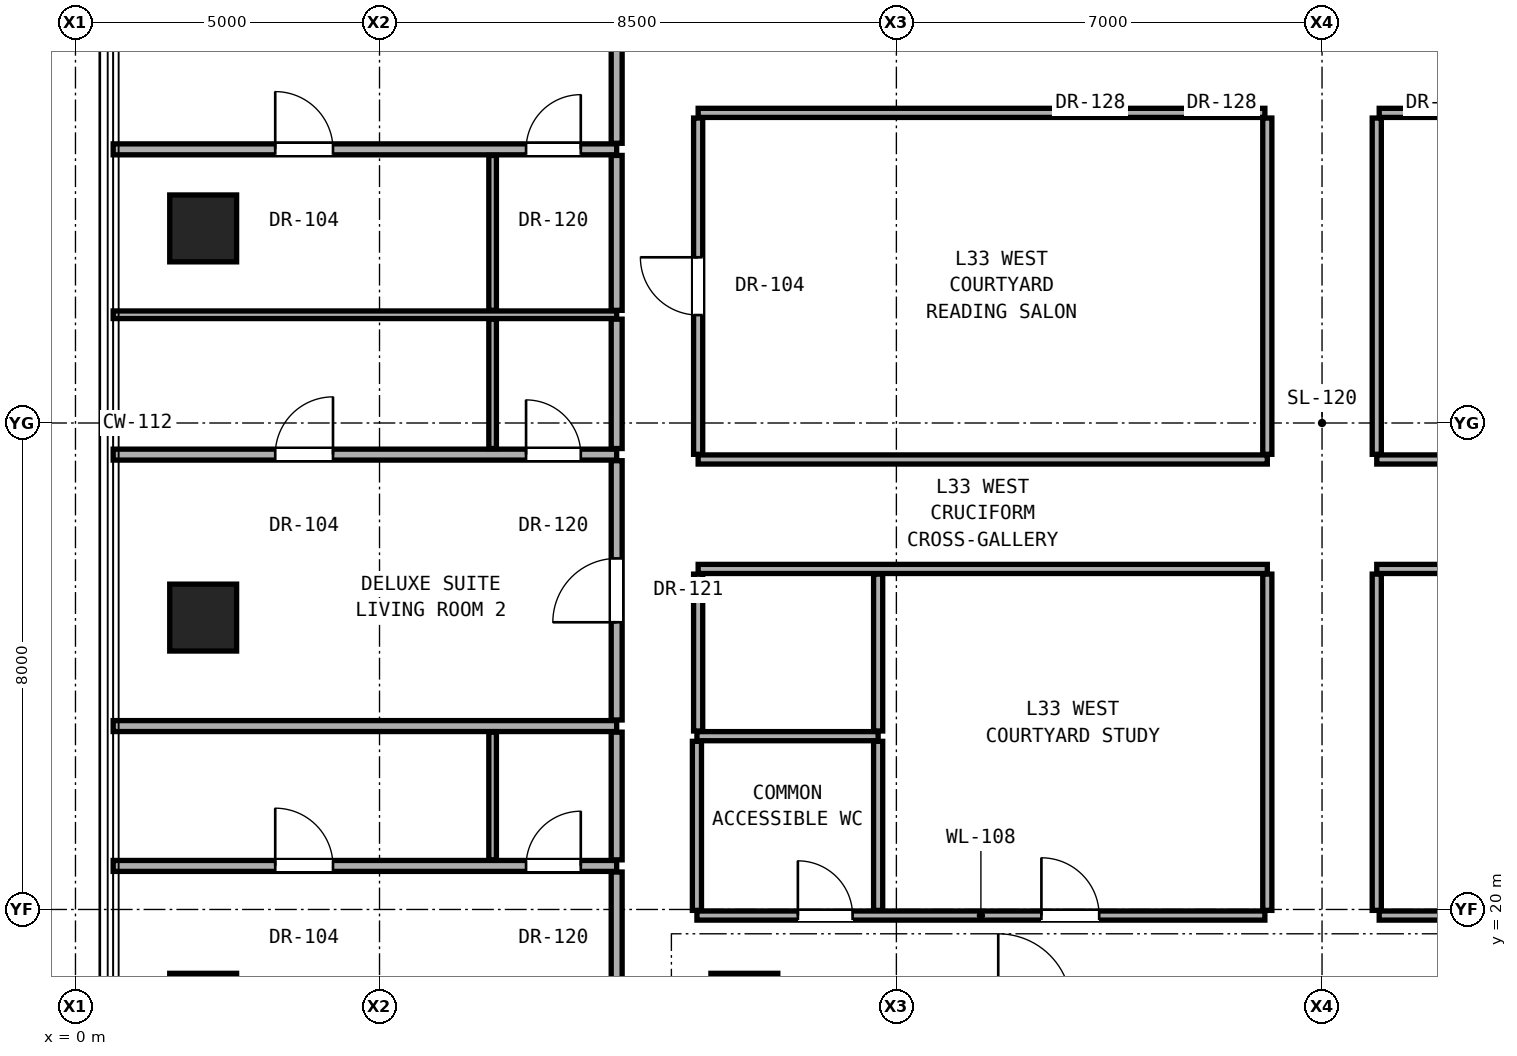
"""IFC4 building model, lengths in metres.
Left out: names, types, materials, properties, quantities, classifications, styles, units other than length and angle.
Written with IfcOpenShell. Run it as: python <this file> out.ifc"""

import sys

from ifc_helpers import new_model, si_unit, direction, frame, frame_2d, origin, origin_2d, place, context, subcontext, project, spatial, rectangle, hollow_rectangle, extrude, element, fill, save


model = new_model("IFC4")
c1 = context("Model", 3, precision=1e-05, world=origin(), true_north=direction((0.0, 1.0)))
c2 = subcontext(c1, "Body", "Model", "MODEL_VIEW")
j1 = project(units=[si_unit("LENGTHUNIT", "METRE"), si_unit("PLANEANGLEUNIT", "RADIAN")], contexts=[c1])
p1 = place(None, origin())
s1 = spatial("IfcSite", under=j1, at=p1, CompositionType="ELEMENT")
p2 = place(p1, origin())
s2 = spatial("IfcBuilding", under=s1, at=p2, CompositionType="ELEMENT")
p3 = place(p2, frame((0.0, 0.0, 118.1)))
s3 = spatial("IfcBuildingStorey", under=s2, at=p3, CompositionType="ELEMENT", Elevation=118.1)
p4 = place(p3, frame((11.0, 18.4, 0.0), z_axis=(0.0, 0.0, 1.0), x_axis=(1.0, 0.0, 0.0)))
e1 = element("IfcColumn", 1, at=p4, inside=s3, PredefinedType="COLUMN", context=c2, shape_type="SweptSolid", body=[
    extrude(rectangle(XDim=1.1, YDim=1.1, at=origin_2d()), origin(), (0.0, 0.0, 1.0), 3.3),
])
for number, where, z_axis, x_axis in (
    (2, (2.1, 18.4, 0.0), (0.0, 0.0, 1.0), (1.0, 0.0, 0.0)),
    (3, (2.1, 24.8, 0.0), (0.0, 0.0, 1.0), (1.0, 0.0, 0.0)),
    (4, (2.1, 31.2, 0.0), (0.0, 0.0, 1.0), (1.0, 0.0, 0.0)),
):
    element("IfcColumn", number, at=place(p3, frame(where, z_axis=z_axis, x_axis=x_axis)), inside=s3, PredefinedType="COLUMN", context=c2, shape_type="SweptSolid", body=[
        extrude(hollow_rectangle(XDim=1.1, YDim=1.1, WallThickness=0.06, at=origin_2d()), origin(), (0.0, 0.0, 1.0), 3.3),
    ])
p5 = place(p3, frame((10.22, 19.9, 0.0), z_axis=(0.0, 0.0, 1.0), x_axis=(1.0, 0.0, 0.0)))
e5 = element("IfcWall", 5, at=p5, inside=s3, PredefinedType="PARTITIONING", context=c2, shape_type="SweptSolid", body=[
    extrude(rectangle(XDim=9.34, YDim=0.15, at=frame_2d((4.67, 0.0))), origin(), (0.0, 0.0, 1.0), 2.216),
])
p6 = place(p5, frame((1.66, 0.0, 0.0)))
e6 = element("IfcOpeningElement", 6, at=p6, cuts=e5, PredefinedType="OPENING", context=c2, shape_type="SweptSolid", body=[
    extrude(rectangle(XDim=0.9, YDim=2.1, at=frame_2d((0.45, 1.05))), frame((0.0, 0.085, 0.0), z_axis=(0.0, -1.0, 0.0), x_axis=(1.0, 0.0, 0.0)), (0.0, 0.0, 1.0), 0.17),
])
p7 = place(p5, frame((5.665, 0.0, 0.0)))
e7 = element("IfcOpeningElement", 7, at=p7, cuts=e5, PredefinedType="OPENING", context=c2, shape_type="SweptSolid", body=[
    extrude(rectangle(XDim=0.95, YDim=2.15, at=frame_2d((0.475, 1.075))), frame((0.0, 0.085, 0.0), z_axis=(0.0, -1.0, 0.0), x_axis=(1.0, 0.0, 0.0)), (0.0, 0.0, 1.0), 0.17),
])
p8 = place(p3, frame((21.44, 19.9, 0.0), z_axis=(0.0, 0.0, 1.0), x_axis=(1.0, 0.0, 0.0)))
e8 = element("IfcWall", 8, at=p8, inside=s3, PredefinedType="PARTITIONING", context=c2, shape_type="SweptSolid", body=[
    extrude(rectangle(XDim=9.32, YDim=0.15, at=frame_2d((4.66, 0.0))), origin(), (0.0, 0.0, 1.0), 2.216),
])
p9 = place(p8, frame((4.185, 0.0, 0.0)))
e9 = element("IfcOpeningElement", 9, at=p9, cuts=e8, PredefinedType="OPENING", context=c2, shape_type="SweptSolid", body=[
    extrude(rectangle(XDim=0.95, YDim=2.15, at=frame_2d((0.475, 1.075))), frame((0.0, 0.085, 0.0), z_axis=(0.0, -1.0, 0.0), x_axis=(1.0, 0.0, 0.0)), (0.0, 0.0, 1.0), 0.17),
])
p10 = place(p3, frame((0.62, 20.716, 0.0), z_axis=(0.0, 0.0, 1.0), x_axis=(1.0, 0.0, 0.0)))
e10 = element("IfcWall", 10, at=p10, inside=s3, PredefinedType="PARTITIONING", context=c2, shape_type="SweptSolid", body=[
    extrude(rectangle(XDim=8.28, YDim=0.18, at=frame_2d((4.14, 0.0))), origin(), (0.0, 0.0, 1.0), 2.299),
])
p11 = place(p10, frame((2.665, 0.0, 0.0)))
e11 = element("IfcOpeningElement", 11, at=p11, cuts=e10, PredefinedType="OPENING", context=c2, shape_type="SweptSolid", body=[
    extrude(rectangle(XDim=0.95, YDim=2.15, at=frame_2d((0.475, 1.075))), frame((0.0, 0.1, 0.0), z_axis=(0.0, -1.0, 0.0), x_axis=(1.0, 0.0, 0.0)), (0.0, 0.0, 1.0), 0.2),
])
p12 = place(p10, frame((6.79, 0.0, 0.0)))
e12 = element("IfcOpeningElement", 12, at=p12, cuts=e10, PredefinedType="OPENING", context=c2, shape_type="SweptSolid", body=[
    extrude(rectangle(XDim=0.9, YDim=2.1, at=frame_2d((0.45, 1.05))), frame((0.0, 0.1, 0.0), z_axis=(0.0, -1.0, 0.0), x_axis=(1.0, 0.0, 0.0)), (0.0, 0.0, 1.0), 0.2),
])
p13 = place(p3, frame((10.22, 22.85, 0.0), z_axis=(0.0, 0.0, 1.0), x_axis=(1.0, 0.0, 0.0)))
e13 = element("IfcWall", 13, at=p13, inside=s3, PredefinedType="PARTITIONING", context=c2, shape_type="SweptSolid", body=[
    extrude(rectangle(XDim=2.98, YDim=0.15, at=frame_2d((1.49, 0.0))), origin(), (0.0, 0.0, 1.0), 2.216),
])
p14 = place(p3, frame((0.62, 23.016, 0.0), z_axis=(0.0, 0.0, 1.0), x_axis=(1.0, 0.0, 0.0)))
e14 = element("IfcWall", 14, at=p14, inside=s3, PredefinedType="PARTITIONING", context=c2, shape_type="SweptSolid", body=[
    extrude(rectangle(XDim=8.28, YDim=0.18, at=frame_2d((4.14, 0.0))), origin(), (0.0, 0.0, 1.0), 2.299),
])
for number, where, z_axis, x_axis in (
    (15, (10.24, 25.6, 0.0), (0.0, 0.0, 1.0), (1.0, 0.0, 0.0)),
    (16, (21.4, 25.6, 0.0), (0.0, 0.0, 1.0), (1.0, 0.0, 0.0)),
):
    element("IfcWall", number, at=place(p3, frame(where, z_axis=z_axis, x_axis=x_axis)), inside=s3, PredefinedType="PARTITIONING", context=c2, shape_type="SweptSolid", body=[
        extrude(rectangle(XDim=9.36, YDim=0.15, at=frame_2d((4.68, 0.0))), origin(), (0.0, 0.0, 1.0), 2.216),
    ])
p15 = place(p3, frame((0.62, 27.48, 0.0), z_axis=(0.0, 0.0, 1.0), x_axis=(1.0, 0.0, 0.0)))
e17 = element("IfcWall", 17, at=p15, inside=s3, PredefinedType="PARTITIONING", context=c2, shape_type="SweptSolid", body=[
    extrude(rectangle(XDim=8.28, YDim=0.18, at=frame_2d((4.14, 0.0))), origin(), (0.0, 0.0, 1.0), 2.299),
])
p16 = place(p15, frame((2.665, 0.0, 0.0)))
e18 = element("IfcOpeningElement", 18, at=p16, cuts=e17, PredefinedType="OPENING", context=c2, shape_type="SweptSolid", body=[
    extrude(rectangle(XDim=0.95, YDim=2.15, at=frame_2d((0.475, 1.075))), frame((0.0, 0.1, 0.0), z_axis=(0.0, -1.0, 0.0), x_axis=(1.0, 0.0, 0.0)), (0.0, 0.0, 1.0), 0.2),
])
p17 = place(p15, frame((6.79, 0.0, 0.0)))
e19 = element("IfcOpeningElement", 19, at=p17, cuts=e17, PredefinedType="OPENING", context=c2, shape_type="SweptSolid", body=[
    extrude(rectangle(XDim=0.9, YDim=2.1, at=frame_2d((0.45, 1.05))), frame((0.0, 0.1, 0.0), z_axis=(0.0, -1.0, 0.0), x_axis=(1.0, 0.0, 0.0)), (0.0, 0.0, 1.0), 0.2),
])
for number, where, z_axis, x_axis in (
    (20, (10.24, 27.4, 0.0), (0.0, 0.0, 1.0), (1.0, 0.0, 0.0)),
    (21, (21.4, 27.4, 0.0), (0.0, 0.0, 1.0), (1.0, 0.0, 0.0)),
):
    element("IfcWall", number, at=place(p3, frame(where, z_axis=z_axis, x_axis=x_axis)), inside=s3, PredefinedType="PARTITIONING", context=c2, shape_type="SweptSolid", body=[
        extrude(rectangle(XDim=9.36, YDim=0.15, at=frame_2d((4.68, 0.0))), origin(), (0.0, 0.0, 1.0), 2.216),
    ])
p18 = place(p3, frame((0.62, 29.78, 0.0), z_axis=(0.0, 0.0, 1.0), x_axis=(1.0, 0.0, 0.0)))
e22 = element("IfcWall", 22, at=p18, inside=s3, PredefinedType="PARTITIONING", context=c2, shape_type="SweptSolid", body=[
    extrude(rectangle(XDim=8.28, YDim=0.125, at=frame_2d((4.14, 0.0))), origin(), (0.0, 0.0, 1.0), 2.299),
])
p19 = place(p3, frame((0.62, 32.5, 0.0), z_axis=(0.0, 0.0, 1.0), x_axis=(1.0, 0.0, 0.0)))
e23 = element("IfcWall", 23, at=p19, inside=s3, PredefinedType="PARTITIONING", context=c2, shape_type="SweptSolid", body=[
    extrude(rectangle(XDim=8.28, YDim=0.18, at=frame_2d((4.14, 0.0))), origin(), (0.0, 0.0, 1.0), 2.299),
])
p20 = place(p19, frame((2.665, 0.0, 0.0)))
e24 = element("IfcOpeningElement", 24, at=p20, cuts=e23, PredefinedType="OPENING", context=c2, shape_type="SweptSolid", body=[
    extrude(rectangle(XDim=0.95, YDim=2.15, at=frame_2d((0.475, 1.075))), frame((0.0, 0.1, 0.0), z_axis=(0.0, -1.0, 0.0), x_axis=(1.0, 0.0, 0.0)), (0.0, 0.0, 1.0), 0.2),
])
p21 = place(p19, frame((6.79, 0.0, 0.0)))
e25 = element("IfcOpeningElement", 25, at=p21, cuts=e23, PredefinedType="OPENING", context=c2, shape_type="SweptSolid", body=[
    extrude(rectangle(XDim=0.9, YDim=2.1, at=frame_2d((0.45, 1.05))), frame((0.0, 0.1, 0.0), z_axis=(0.0, -1.0, 0.0), x_axis=(1.0, 0.0, 0.0)), (0.0, 0.0, 1.0), 0.2),
])
p22 = place(p3, frame((10.24, 33.1, 0.0), z_axis=(0.0, 0.0, 1.0), x_axis=(1.0, 0.0, 0.0)))
e26 = element("IfcWall", 26, at=p22, inside=s3, PredefinedType="PARTITIONING", context=c2, shape_type="SweptSolid", body=[
    extrude(rectangle(XDim=9.32, YDim=0.15, at=frame_2d((4.66, 0.0))), origin(), (0.0, 0.0, 1.0), 2.216),
])
p23 = place(p3, frame((21.44, 33.1, 0.0), z_axis=(0.0, 0.0, 1.0), x_axis=(1.0, 0.0, 0.0)))
e27 = element("IfcWall", 27, at=p23, inside=s3, PredefinedType="PARTITIONING", context=c2, shape_type="SweptSolid", body=[
    extrude(rectangle(XDim=9.32, YDim=0.15, at=frame_2d((4.66, 0.0))), origin(), (0.0, 0.0, 1.0), 2.216),
])
p24 = place(p23, frame((4.185, 0.0, 0.0)))
e28 = element("IfcOpeningElement", 28, at=p24, cuts=e27, PredefinedType="OPENING", context=c2, shape_type="SweptSolid", body=[
    extrude(rectangle(XDim=0.95, YDim=2.15, at=frame_2d((0.475, 1.075))), frame((0.0, 0.085, 0.0), z_axis=(0.0, -1.0, 0.0), x_axis=(1.0, 0.0, 0.0)), (0.0, 0.0, 1.0), 0.17),
])
p25 = place(p3, frame((6.86, 20.816, 0.0), z_axis=(0.0, 0.0, 1.0), x_axis=(0.0, 1.0, 0.0)))
e29 = element("IfcWall", 29, at=p25, inside=s3, PredefinedType="PARTITIONING", context=c2, shape_type="SweptSolid", body=[
    extrude(rectangle(XDim=2.1, YDim=0.125, at=frame_2d((1.05, 0.0))), origin(), (0.0, 0.0, 1.0), 3.08),
])
p26 = place(p3, frame((6.86, 27.58, 0.0), z_axis=(0.0, 0.0, 1.0), x_axis=(0.0, 1.0, 0.0)))
e30 = element("IfcWall", 30, at=p26, inside=s3, PredefinedType="PARTITIONING", context=c2, shape_type="SweptSolid", body=[
    extrude(rectangle(XDim=2.127, YDim=0.125, at=frame_2d((1.064, 0.0))), origin(), (0.0, 0.0, 1.0), 3.08),
])
p27 = place(p3, frame((6.86, 29.853, 0.0), z_axis=(0.0, 0.0, 1.0), x_axis=(0.0, 1.0, 0.0)))
e31 = element("IfcWall", 31, at=p27, inside=s3, PredefinedType="PARTITIONING", context=c2, shape_type="SweptSolid", body=[
    extrude(rectangle(XDim=2.547, YDim=0.125, at=frame_2d((1.274, 0.0))), origin(), (0.0, 0.0, 1.0), 2.299),
])
p28 = place(p3, frame((8.9, 15.05, 0.0), z_axis=(0.0, 0.0, 1.0), x_axis=(0.0, 1.0, 0.0)))
e32 = element("IfcWall", 32, at=p28, inside=s3, PredefinedType="PARTITIONING", context=c2, shape_type="SweptSolid", body=[
    extrude(rectangle(XDim=5.566, YDim=0.18, at=frame_2d((2.783, 0.0))), origin(), (0.0, 0.0, 1.0), 2.456),
])
p29 = place(p28, frame((2.258, 0.0, 0.0)))
e33 = element("IfcOpeningElement", 33, at=p29, cuts=e32, PredefinedType="OPENING", context=c2, shape_type="SweptSolid", body=[
    extrude(rectangle(XDim=1.05, YDim=2.2, at=frame_2d((0.525, 1.1))), frame((0.0, 0.1, 0.0), z_axis=(0.0, -1.0, 0.0), x_axis=(1.0, 0.0, 0.0)), (0.0, 0.0, 1.0), 0.2),
])
p30 = place(p3, frame((8.9, 20.816, 0.0), z_axis=(0.0, 0.0, 1.0), x_axis=(0.0, 1.0, 0.0)))
e34 = element("IfcWall", 34, at=p30, inside=s3, PredefinedType="PARTITIONING", context=c2, shape_type="SweptSolid", body=[
    extrude(rectangle(XDim=2.1, YDim=0.18, at=frame_2d((1.05, 0.0))), origin(), (0.0, 0.0, 1.0), 3.08),
])
p31 = place(p3, frame((8.9, 23.116, 0.0), z_axis=(0.0, 0.0, 1.0), x_axis=(0.0, 1.0, 0.0)))
e35 = element("IfcWall", 35, at=p31, inside=s3, PredefinedType="PARTITIONING", context=c2, shape_type="SweptSolid", body=[
    extrude(rectangle(XDim=4.264, YDim=0.18, at=frame_2d((2.132, 0.0))), origin(), (0.0, 0.0, 1.0), 2.299),
])
p32 = place(p31, frame((1.607, 0.0, 0.0)))
e36 = element("IfcOpeningElement", 36, at=p32, cuts=e35, PredefinedType="OPENING", context=c2, shape_type="SweptSolid", body=[
    extrude(rectangle(XDim=1.05, YDim=2.2, at=frame_2d((0.525, 1.1))), frame((0.0, 0.1, 0.0), z_axis=(0.0, -1.0, 0.0), x_axis=(1.0, 0.0, 0.0)), (0.0, 0.0, 1.0), 0.2),
])
p33 = place(p3, frame((8.9, 27.58, 0.0), z_axis=(0.0, 0.0, 1.0), x_axis=(0.0, 1.0, 0.0)))
e37 = element("IfcWall", 37, at=p33, inside=s3, PredefinedType="PARTITIONING", context=c2, shape_type="SweptSolid", body=[
    extrude(rectangle(XDim=2.127, YDim=0.18, at=frame_2d((1.064, 0.0))), origin(), (0.0, 0.0, 1.0), 3.08),
])
p34 = place(p3, frame((8.9, 29.853, 0.0), z_axis=(0.0, 0.0, 1.0), x_axis=(0.0, 1.0, 0.0)))
e38 = element("IfcWall", 38, at=p34, inside=s3, PredefinedType="PARTITIONING", context=c2, shape_type="SweptSolid", body=[
    extrude(rectangle(XDim=2.547, YDim=0.18, at=frame_2d((1.274, 0.0))), origin(), (0.0, 0.0, 1.0), 2.299),
])
p35 = place(p3, frame((8.9, 32.6, 0.0), z_axis=(0.0, 0.0, 1.0), x_axis=(0.0, 1.0, 0.0)))
e39 = element("IfcWall", 39, at=p35, inside=s3, PredefinedType="PARTITIONING", context=c2, shape_type="SweptSolid", body=[
    extrude(rectangle(XDim=8.35, YDim=0.18, at=frame_2d((4.175, 0.0))), origin(), (0.0, 0.0, 1.0), 2.456),
])
p36 = place(p35, frame((3.65, 0.0, 0.0)))
e40 = element("IfcOpeningElement", 40, at=p36, cuts=e39, PredefinedType="OPENING", context=c2, shape_type="SweptSolid", body=[
    extrude(rectangle(XDim=1.05, YDim=2.2, at=frame_2d((0.525, 1.1))), frame((0.0, 0.1, 0.0), z_axis=(0.0, -1.0, 0.0), x_axis=(1.0, 0.0, 0.0)), (0.0, 0.0, 1.0), 0.2),
])
p37 = place(p3, frame((10.22, 19.985, 0.0), z_axis=(0.0, 0.0, 1.0), x_axis=(0.0, 1.0, 0.0)))
e41 = element("IfcWall", 41, at=p37, inside=s3, PredefinedType="PARTITIONING", context=c2, shape_type="SweptSolid", body=[
    extrude(rectangle(XDim=2.78, YDim=0.15, at=frame_2d((1.39, 0.0))), origin(), (0.0, 0.0, 1.0), 3.08),
])
p38 = place(p3, frame((10.24, 22.935, 0.0), z_axis=(0.0, 0.0, 1.0), x_axis=(0.0, 1.0, 0.0)))
e42 = element("IfcWall", 42, at=p38, inside=s3, PredefinedType="PARTITIONING", context=c2, shape_type="SweptSolid", body=[
    extrude(rectangle(XDim=2.58, YDim=0.15, at=frame_2d((1.29, 0.0))), origin(), (0.0, 0.0, 1.0), 2.299),
])
p39 = place(p3, frame((10.24, 27.485, 0.0), z_axis=(0.0, 0.0, 1.0), x_axis=(0.0, 1.0, 0.0)))
e43 = element("IfcWall", 43, at=p39, inside=s3, PredefinedType="PARTITIONING", context=c2, shape_type="SweptSolid", body=[
    extrude(rectangle(XDim=5.53, YDim=0.15, at=frame_2d((2.765, 0.0))), origin(), (0.0, 0.0, 1.0), 2.299),
])
p40 = place(p39, frame((2.29, 0.0, 0.0)))
e44 = element("IfcOpeningElement", 44, at=p40, cuts=e43, PredefinedType="OPENING", context=c2, shape_type="SweptSolid", body=[
    extrude(rectangle(XDim=0.95, YDim=2.15, at=frame_2d((0.475, 1.075))), frame((0.0, 0.085, 0.0), z_axis=(0.0, -1.0, 0.0), x_axis=(1.0, 0.0, 0.0)), (0.0, 0.0, 1.0), 0.17),
])
p41 = place(p3, frame((13.2, 19.985, 0.0), z_axis=(0.0, 0.0, 1.0), x_axis=(0.0, 1.0, 0.0)))
e45 = element("IfcWall", 45, at=p41, inside=s3, PredefinedType="PARTITIONING", context=c2, shape_type="SweptSolid", body=[
    extrude(rectangle(XDim=2.78, YDim=0.15, at=frame_2d((1.39, 0.0))), origin(), (0.0, 0.0, 1.0), 3.08),
])
p42 = place(p3, frame((13.2, 22.935, 0.0), z_axis=(0.0, 0.0, 1.0), x_axis=(0.0, 1.0, 0.0)))
e46 = element("IfcWall", 46, at=p42, inside=s3, PredefinedType="PARTITIONING", context=c2, shape_type="SweptSolid", body=[
    extrude(rectangle(XDim=2.58, YDim=0.15, at=frame_2d((1.29, 0.0))), origin(), (0.0, 0.0, 1.0), 2.216),
])
for number, where, z_axis, x_axis in (
    (47, (19.6, 19.985, 0.0), (0.0, 0.0, 1.0), (0.0, 1.0, 0.0)),
    (48, (19.6, 27.485, 0.0), (0.0, 0.0, 1.0), (0.0, 1.0, 0.0)),
    (49, (21.4, 19.985, 0.0), (0.0, 0.0, 1.0), (0.0, 1.0, 0.0)),
    (50, (21.4, 27.485, 0.0), (0.0, 0.0, 1.0), (0.0, 1.0, 0.0)),
):
    element("IfcWall", number, at=place(p3, frame(where, z_axis=z_axis, x_axis=x_axis)), inside=s3, PredefinedType="PARTITIONING", context=c2, shape_type="SweptSolid", body=[
        extrude(rectangle(XDim=5.53, YDim=0.15, at=frame_2d((2.765, 0.0))), origin(), (0.0, 0.0, 1.0), 2.216),
    ])
p43 = place(p6, origin())
e51 = element("IfcDoor", 51, at=p43, inside=s3, OperationType="SINGLE_SWING_LEFT", PredefinedType="DOOR", context=c2, shape_type="SweptSolid", body=[
    extrude(rectangle(XDim=0.9, YDim=2.1, at=frame_2d((0.45, 1.05))), frame((0.0, 0.025, 0.0), z_axis=(0.0, -1.0, 0.0), x_axis=(1.0, 0.0, 0.0)), (0.0, 0.0, 1.0), 0.05),
])
fill(e6, e51)
p44 = place(p11, origin())
e52 = element("IfcDoor", 52, at=p44, inside=s3, OperationType="SINGLE_SWING_LEFT", PredefinedType="DOOR", context=c2, shape_type="SweptSolid", body=[
    extrude(rectangle(XDim=0.95, YDim=2.15, at=frame_2d((0.475, 1.075))), frame((0.0, 0.025, 0.0), z_axis=(0.0, -1.0, 0.0), x_axis=(1.0, 0.0, 0.0)), (0.0, 0.0, 1.0), 0.05),
])
fill(e11, e52)
p45 = place(p12, origin())
e53 = element("IfcDoor", 53, at=p45, inside=s3, OperationType="SINGLE_SWING_RIGHT", PredefinedType="DOOR", context=c2, shape_type="SweptSolid", body=[
    extrude(rectangle(XDim=0.9, YDim=2.1, at=frame_2d((0.45, 1.05))), frame((0.0, 0.025, 0.0), z_axis=(0.0, -1.0, 0.0), x_axis=(1.0, 0.0, 0.0)), (0.0, 0.0, 1.0), 0.05),
])
fill(e12, e53)
p46 = place(p32, origin())
e54 = element("IfcDoor", 54, at=p46, inside=s3, OperationType="SINGLE_SWING_LEFT", PredefinedType="DOOR", context=c2, shape_type="SweptSolid", body=[
    extrude(rectangle(XDim=1.05, YDim=2.2, at=frame_2d((0.525, 1.1))), frame((0.0, 0.025, 0.0), z_axis=(0.0, -1.0, 0.0), x_axis=(1.0, 0.0, 0.0)), (0.0, 0.0, 1.0), 0.05),
])
fill(e36, e54)
p47 = place(p16, origin())
e55 = element("IfcDoor", 55, at=p47, inside=s3, OperationType="SINGLE_SWING_RIGHT", PredefinedType="DOOR", context=c2, shape_type="SweptSolid", body=[
    extrude(rectangle(XDim=0.95, YDim=2.15, at=frame_2d((0.475, 1.075))), frame((0.0, 0.025, 0.0), z_axis=(0.0, -1.0, 0.0), x_axis=(1.0, 0.0, 0.0)), (0.0, 0.0, 1.0), 0.05),
])
fill(e18, e55)
p48 = place(p17, origin())
e56 = element("IfcDoor", 56, at=p48, inside=s3, OperationType="SINGLE_SWING_LEFT", PredefinedType="DOOR", context=c2, shape_type="SweptSolid", body=[
    extrude(rectangle(XDim=0.9, YDim=2.1, at=frame_2d((0.45, 1.05))), frame((0.0, 0.025, 0.0), z_axis=(0.0, -1.0, 0.0), x_axis=(1.0, 0.0, 0.0)), (0.0, 0.0, 1.0), 0.05),
])
fill(e19, e56)
p49 = place(p20, origin())
e57 = element("IfcDoor", 57, at=p49, inside=s3, OperationType="SINGLE_SWING_LEFT", PredefinedType="DOOR", context=c2, shape_type="SweptSolid", body=[
    extrude(rectangle(XDim=0.95, YDim=2.15, at=frame_2d((0.475, 1.075))), frame((0.0, 0.025, 0.0), z_axis=(0.0, -1.0, 0.0), x_axis=(1.0, 0.0, 0.0)), (0.0, 0.0, 1.0), 0.05),
])
fill(e24, e57)
p50 = place(p21, origin())
e58 = element("IfcDoor", 58, at=p50, inside=s3, OperationType="SINGLE_SWING_RIGHT", PredefinedType="DOOR", context=c2, shape_type="SweptSolid", body=[
    extrude(rectangle(XDim=0.9, YDim=2.1, at=frame_2d((0.45, 1.05))), frame((0.0, 0.025, 0.0), z_axis=(0.0, -1.0, 0.0), x_axis=(1.0, 0.0, 0.0)), (0.0, 0.0, 1.0), 0.05),
])
fill(e25, e58)
p51 = place(p7, origin())
e59 = element("IfcDoor", 59, at=p51, inside=s3, OperationType="SINGLE_SWING_LEFT", PredefinedType="DOOR", context=c2, shape_type="SweptSolid", body=[
    extrude(rectangle(XDim=0.95, YDim=2.15, at=frame_2d((0.475, 1.075))), frame((0.0, 0.025, 0.0), z_axis=(0.0, -1.0, 0.0), x_axis=(1.0, 0.0, 0.0)), (0.0, 0.0, 1.0), 0.05),
])
fill(e7, e59)
p52 = place(p40, origin())
e60 = element("IfcDoor", 60, at=p52, inside=s3, OperationType="SINGLE_SWING_RIGHT", PredefinedType="DOOR", context=c2, shape_type="SweptSolid", body=[
    extrude(rectangle(XDim=0.95, YDim=2.15, at=frame_2d((0.475, 1.075))), frame((0.0, 0.025, 0.0), z_axis=(0.0, -1.0, 0.0), x_axis=(1.0, 0.0, 0.0)), (0.0, 0.0, 1.0), 0.05),
])
fill(e44, e60)
save(model, sys.argv[1])
